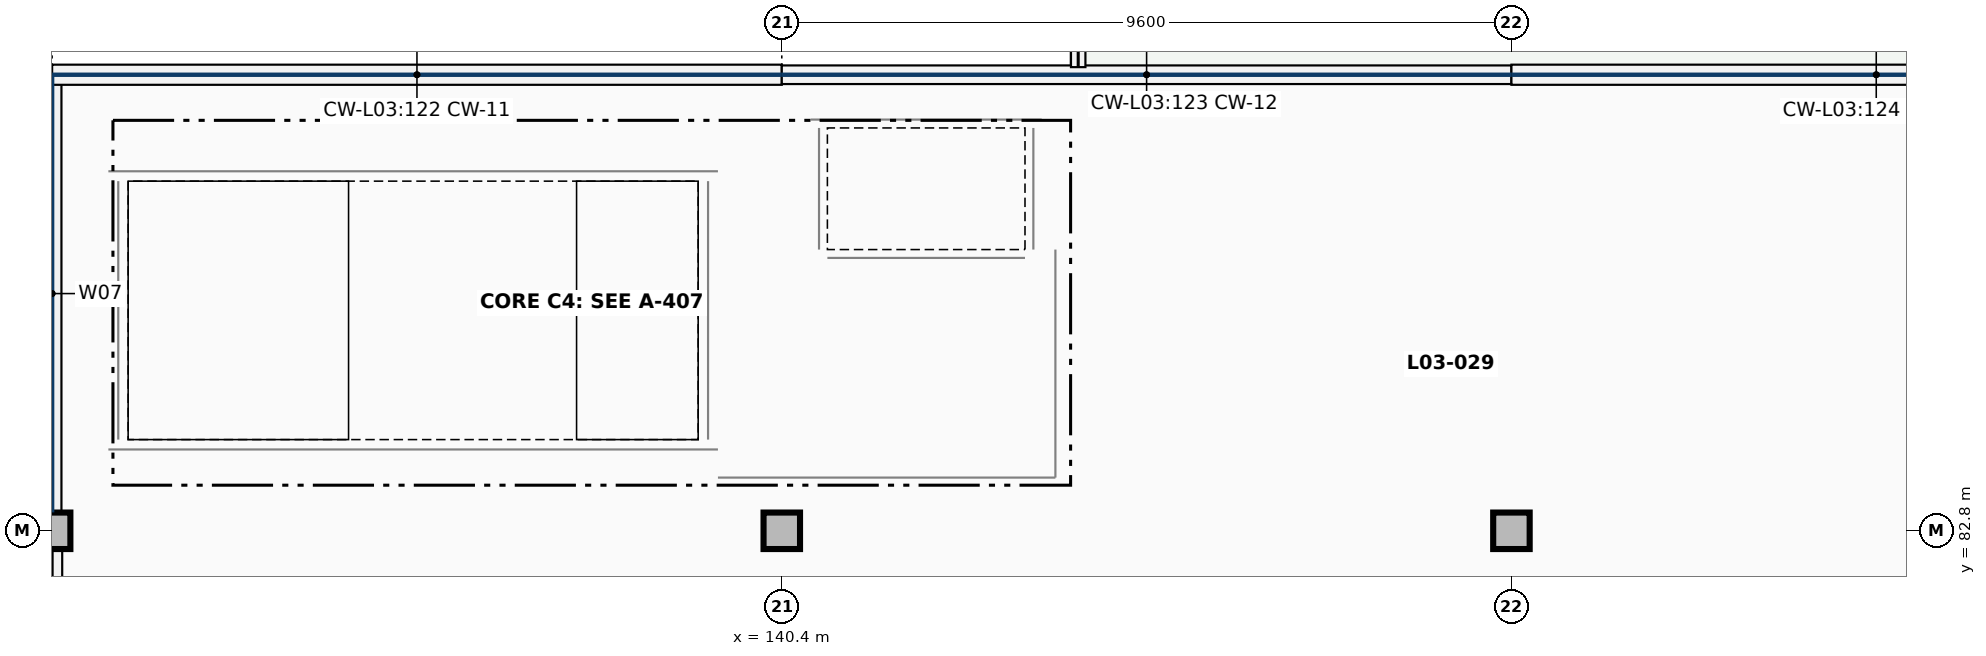
"""IFC4 building model, lengths in metres.
Left out: names, types, materials, properties, quantities, classifications, styles, units other than length and angle.
Written with IfcOpenShell. Run it as: python <this file> out.ifc"""

import sys

from ifc_helpers import new_model, si_unit, direction, frame, frame_2d, origin, origin_2d, place, context, subcontext, project, spatial, rectangle, extrude, element, fill, save


model = new_model("IFC4")
c1 = context("Model", 3, precision=1e-05, world=origin(), true_north=direction((0.0, 1.0)))
c2 = subcontext(c1, "Body", "Model", "MODEL_VIEW")
j1 = project(units=[si_unit("LENGTHUNIT", "METRE"), si_unit("PLANEANGLEUNIT", "RADIAN")], contexts=[c1])
p1 = place(None, origin())
s1 = spatial("IfcSite", under=j1, at=p1, CompositionType="ELEMENT")
p2 = place(p1, origin())
s2 = spatial("IfcBuilding", under=s1, at=p2, CompositionType="ELEMENT")
p3 = place(p2, frame((0.0, 0.0, 13.6)))
s3 = spatial("IfcBuildingStorey", under=s2, at=p3, CompositionType="ELEMENT", Elevation=13.6)
for number, where, z_axis, x_axis in (
    (1, (130.8, 82.8, 0.0), (0.0, 0.0, 1.0), (1.0, 0.0, 0.0)),
    (2, (140.4, 82.8, 0.0), (0.0, 0.0, 1.0), (1.0, 0.0, 0.0)),
    (3, (150.0, 82.8, 0.0), (0.0, 0.0, 1.0), (1.0, 0.0, 0.0)),
):
    element("IfcColumn", number, at=place(p3, frame(where, z_axis=z_axis, x_axis=x_axis)), inside=s3, PredefinedType="COLUMN", context=c2, shape_type="SweptSolid", body=[
        extrude(rectangle(XDim=0.48, YDim=0.48, at=origin_2d()), origin(), (0.0, 0.0, 1.0), 3.74),
    ])
p4 = place(p3, frame((130.8, 79.442, 0.0), z_axis=(0.0, 0.0, 1.0), x_axis=(0.0, 1.0, 0.0)))
e4 = element("IfcWall", 4, at=p4, inside=s3, PredefinedType="SOLIDWALL", context=c2, shape_type="SweptSolid", body=[
    extrude(rectangle(XDim=3.116, YDim=0.265, at=frame_2d((1.558, 0.0))), origin(), (0.0, 0.0, 1.0), 2.809),
])
p5 = place(p3, frame((130.8, 83.042, 0.0), z_axis=(0.0, 0.0, 1.0), x_axis=(0.0, 1.0, 0.0)))
e5 = element("IfcWall", 5, at=p5, inside=s3, PredefinedType="SOLIDWALL", context=c2, shape_type="SweptSolid", body=[
    extrude(rectangle(XDim=5.758, YDim=0.245, at=frame_2d((2.879, 0.0))), origin(), (0.0, 0.0, 1.0), 0.85),
])
p6 = place(p3, frame((130.8, 88.8, 0.0), z_axis=(0.0, 0.0, 1.0), x_axis=(1.0, 0.0, 0.0)))
e6 = element("IfcWall", 6, at=p6, inside=s3, PredefinedType="SOLIDWALL", context=c2, shape_type="SweptSolid", body=[
    extrude(rectangle(XDim=9.6, YDim=0.265, at=frame_2d((4.8, 0.0))), origin(), (0.0, 0.0, 1.0), 0.85),
])
p7 = place(p3, frame((140.4, 88.8, 0.0), z_axis=(0.0, 0.0, 1.0), x_axis=(1.0, 0.0, 0.0)))
e7 = element("IfcWall", 7, at=p7, inside=s3, PredefinedType="SOLIDWALL", context=c2, shape_type="SweptSolid", body=[
    extrude(rectangle(XDim=9.6, YDim=0.245, at=frame_2d((4.8, 0.0))), origin(), (0.0, 0.0, 1.0), 0.85),
])
p8 = place(p3, frame((150.0, 88.8, 0.0), z_axis=(0.0, 0.0, 1.0), x_axis=(1.0, 0.0, 0.0)))
e8 = element("IfcWall", 8, at=p8, inside=s3, PredefinedType="SOLIDWALL", context=c2, shape_type="SweptSolid", body=[
    extrude(rectangle(XDim=9.6, YDim=0.265, at=frame_2d((4.8, 0.0))), origin(), (0.0, 0.0, 1.0), 0.85),
])
p9 = place(p3, frame((144.3, 113.9, 0.0), z_axis=(0.0, 0.0, 1.0), x_axis=(0.0, -1.0, 0.0)))
e9 = element("IfcWall", 9, at=p9, inside=s3, PredefinedType="PARAPET", context=c2, shape_type="SweptSolid", body=[
    extrude(rectangle(XDim=25.0, YDim=0.19, at=frame_2d((12.5, 0.0))), origin(), (0.0, 0.0, 1.0), 1.15),
])
p10 = place(p3, frame((131.67, 84.0, 0.0), z_axis=(0.0, 0.0, 1.0), x_axis=(0.0, 1.0, 0.0)))
e10 = element("IfcWall", 10, at=p10, inside=s3, PredefinedType="SHEAR", context=c2, shape_type="SweptSolid", body=[
    extrude(rectangle(XDim=3.4, YDim=0.26, at=frame_2d((1.7, 0.0))), origin(), (0.0, 0.0, 1.0), 3.74),
])
for number, where, z_axis, x_axis in (
    (11, (131.54, 83.87, 0.0), (0.0, 0.0, 1.0), (1.0, 0.0, 0.0)),
    (12, (131.54, 87.53, 0.0), (0.0, 0.0, 1.0), (1.0, 0.0, 0.0)),
):
    element("IfcWall", number, at=place(p3, frame(where, z_axis=z_axis, x_axis=x_axis)), inside=s3, PredefinedType="SHEAR", context=c2, shape_type="SweptSolid", body=[
        extrude(rectangle(XDim=8.02, YDim=0.26, at=frame_2d((4.01, 0.0))), origin(), (0.0, 0.0, 1.0), 3.74),
    ])
p11 = place(p3, frame((139.43, 84.0, 0.0), z_axis=(0.0, 0.0, 1.0), x_axis=(0.0, 1.0, 0.0)))
e13 = element("IfcWall", 13, at=p11, inside=s3, PredefinedType="SHEAR", context=c2, shape_type="SweptSolid", body=[
    extrude(rectangle(XDim=3.4, YDim=0.26, at=frame_2d((1.7, 0.0))), origin(), (0.0, 0.0, 1.0), 3.74),
])
p12 = place(p11, frame((0.65, 0.0, 0.0)))
e14 = element("IfcOpeningElement", 14, at=p12, cuts=e13, PredefinedType="OPENING", context=c2, shape_type="SweptSolid", body=[
    extrude(rectangle(XDim=1.2, YDim=2.2, at=frame_2d((0.6, 1.1))), frame((0.0, 0.14, 0.0), z_axis=(0.0, -1.0, 0.0), x_axis=(1.0, 0.0, 0.0)), (0.0, 0.0, 1.0), 0.28),
])
for number, where, z_axis, x_axis in (
    (15, (140.89, 86.5, 0.0), (0.0, 0.0, 1.0), (0.0, 1.0, 0.0)),
    (16, (143.71, 86.5, 0.0), (0.0, 0.0, 1.0), (0.0, 1.0, 0.0)),
):
    element("IfcWall", number, at=place(p3, frame(where, z_axis=z_axis, x_axis=x_axis)), inside=s3, PredefinedType="SHEAR", context=c2, shape_type="SweptSolid", body=[
        extrude(rectangle(XDim=1.6, YDim=0.22, at=frame_2d((0.8, 0.0))), origin(), (0.0, 0.0, 1.0), 3.74),
    ])
p13 = place(p3, frame((140.78, 88.21, 0.0), z_axis=(0.0, 0.0, 1.0), x_axis=(1.0, 0.0, 0.0)))
e17 = element("IfcWall", 17, at=p13, inside=s3, PredefinedType="SHEAR", context=c2, shape_type="SweptSolid", body=[
    extrude(rectangle(XDim=3.04, YDim=0.22, at=frame_2d((1.52, 0.0))), origin(), (0.0, 0.0, 1.0), 3.74),
])
p14 = place(p3, frame((141.0, 86.39, 0.0), z_axis=(0.0, 0.0, 1.0), x_axis=(1.0, 0.0, 0.0)))
e18 = element("IfcWall", 18, at=p14, inside=s3, PredefinedType="SHEAR", context=c2, shape_type="SweptSolid", body=[
    extrude(rectangle(XDim=2.6, YDim=0.22, at=frame_2d((1.3, 0.0))), origin(), (0.0, 0.0, 1.0), 3.74),
])
p15 = place(p14, frame((0.8, 0.0, 0.0)))
e19 = element("IfcOpeningElement", 19, at=p15, cuts=e18, PredefinedType="OPENING", context=c2, shape_type="SweptSolid", body=[
    extrude(rectangle(XDim=1.0, YDim=2.15, at=frame_2d((0.5, 1.075))), frame((0.0, 0.12, 0.0), z_axis=(0.0, -1.0, 0.0), x_axis=(1.0, 0.0, 0.0)), (0.0, 0.0, 1.0), 0.24),
])
p16 = place(p3, frame((144.0, 83.5, 0.0), z_axis=(0.0, 0.0, 1.0), x_axis=(0.0, 1.0, 0.0)))
e20 = element("IfcWall", 20, at=p16, inside=s3, PredefinedType="PARTITIONING", context=c2, shape_type="SweptSolid", body=[
    extrude(rectangle(XDim=3.0, YDim=0.2, at=frame_2d((1.5, 0.0))), origin(), (0.0, 0.0, 1.0), 3.414),
])
p17 = place(p16, frame((0.775, 0.0, 0.0)))
e21 = element("IfcOpeningElement", 21, at=p17, cuts=e20, PredefinedType="OPENING", context=c2, shape_type="SweptSolid", body=[
    extrude(rectangle(XDim=1.45, YDim=2.2, at=frame_2d((0.725, 1.1))), frame((0.0, 0.11, 0.0), z_axis=(0.0, -1.0, 0.0), x_axis=(1.0, 0.0, 0.0)), (0.0, 0.0, 1.0), 0.22),
])
p18 = place(p3, frame((139.56, 83.5, 0.0), z_axis=(0.0, 0.0, 1.0), x_axis=(1.0, 0.0, 0.0)))
e22 = element("IfcWall", 22, at=p18, inside=s3, PredefinedType="PARTITIONING", context=c2, shape_type="SweptSolid", body=[
    extrude(rectangle(XDim=4.44, YDim=0.2, at=frame_2d((2.22, 0.0))), origin(), (0.0, 0.0, 1.0), 3.414),
])
p19 = place(p12, origin())
e23 = element("IfcDoor", 23, at=p19, inside=s3, OperationType="SINGLE_SWING_RIGHT", PredefinedType="DOOR", context=c2, shape_type="SweptSolid", body=[
    extrude(rectangle(XDim=1.2, YDim=2.2, at=frame_2d((0.6, 1.1))), frame((0.0, 0.025, 0.0), z_axis=(0.0, -1.0, 0.0), x_axis=(1.0, 0.0, 0.0)), (0.0, 0.0, 1.0), 0.05),
])
fill(e14, e23)
p20 = place(p15, origin())
e24 = element("IfcDoor", 24, at=p20, inside=s3, OperationType="DOUBLE_DOOR_SLIDING", PredefinedType="DOOR", context=c2, shape_type="SweptSolid", body=[
    extrude(rectangle(XDim=1.0, YDim=2.15, at=frame_2d((0.5, 1.075))), frame((0.0, 0.025, 0.0), z_axis=(0.0, -1.0, 0.0), x_axis=(1.0, 0.0, 0.0)), (0.0, 0.0, 1.0), 0.05),
])
fill(e19, e24)
p21 = place(p17, frame((1.45, 0.0, 0.0), z_axis=(0.0, 0.0, 1.0), x_axis=(-1.0, 0.0, 0.0)))
e25 = element("IfcDoor", 25, at=p21, inside=s3, OperationType="DOUBLE_DOOR_SINGLE_SWING", PredefinedType="DOOR", context=c2, shape_type="SweptSolid", body=[
    extrude(rectangle(XDim=1.45, YDim=2.2, at=frame_2d((0.725, 1.1))), frame((0.0, 0.025, 0.0), z_axis=(0.0, -1.0, 0.0), x_axis=(1.0, 0.0, 0.0)), (0.0, 0.0, 1.0), 0.05),
])
fill(e21, e25)
save(model, sys.argv[1])
